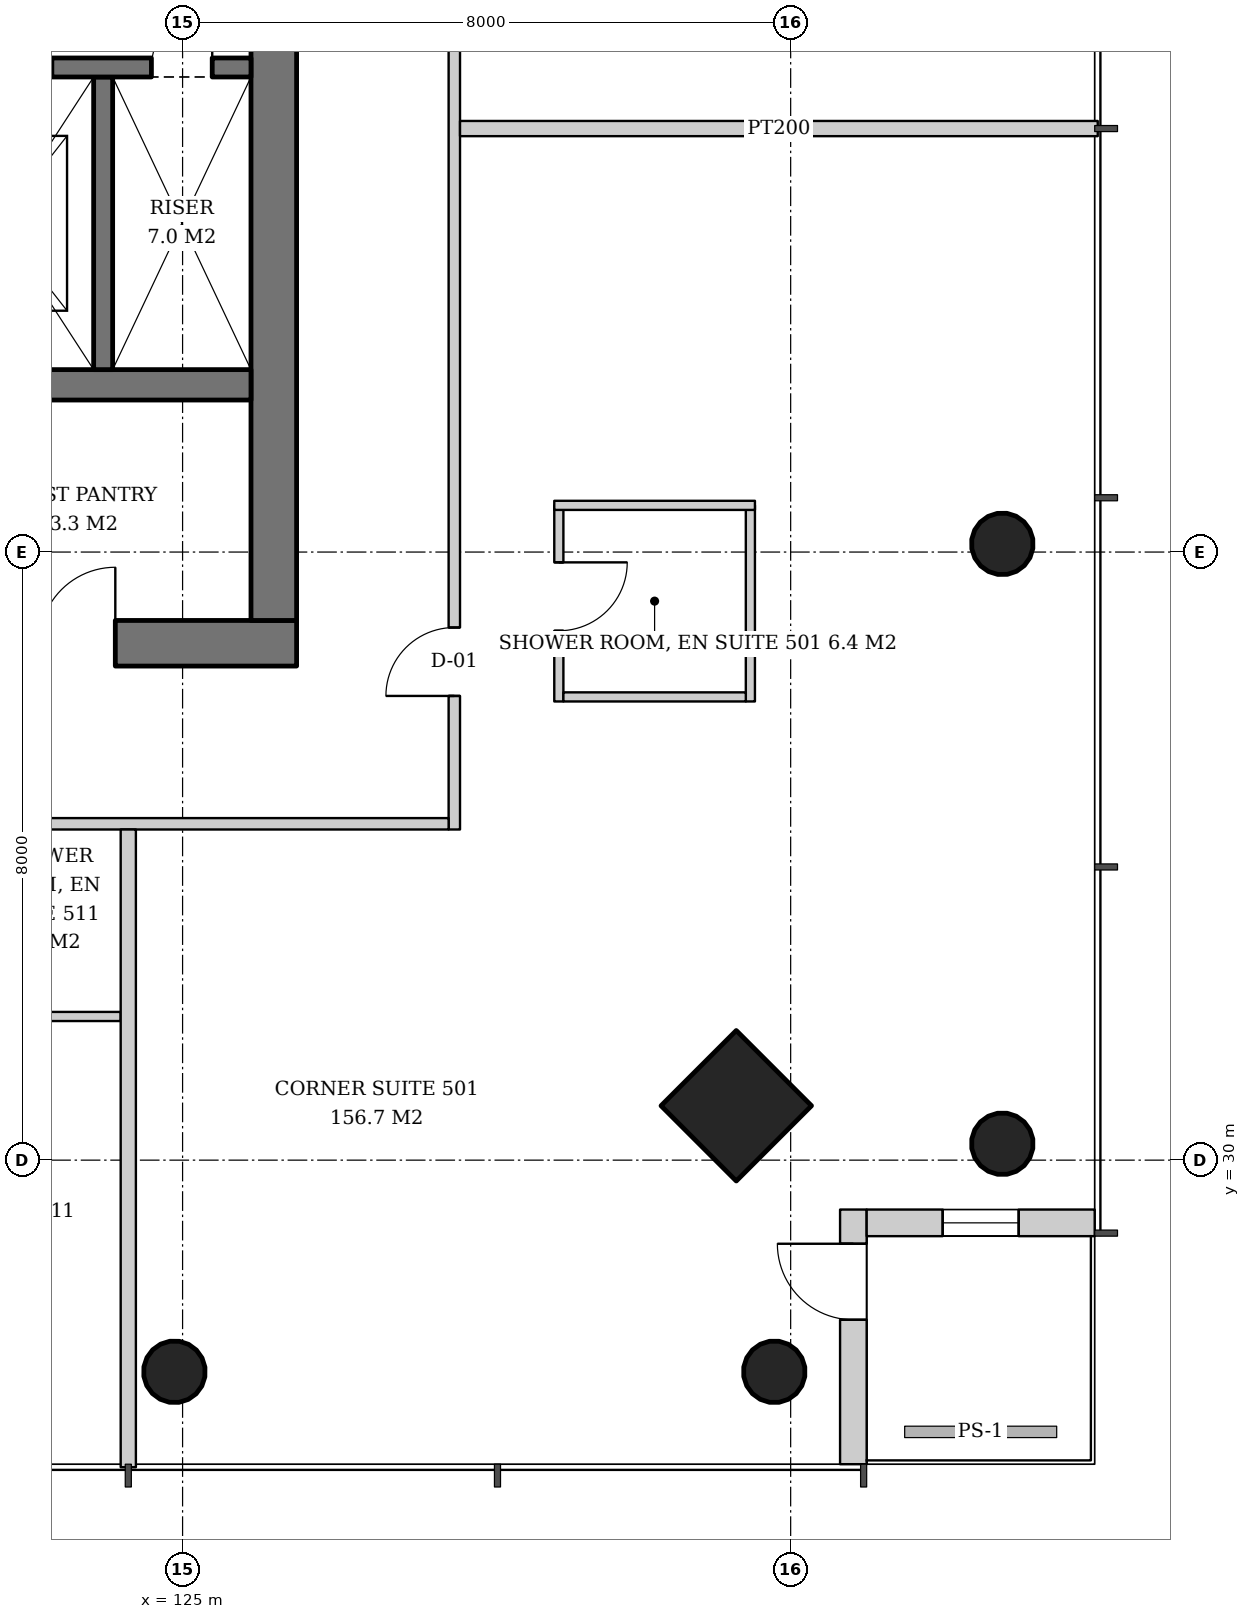
"""IFC4 building model, lengths in metres.
Left out: names, types, materials, properties, quantities, classifications, styles, units other than length and angle.
Written with IfcOpenShell. Run it as: python <this file> out.ifc"""

import sys

from ifc_helpers import new_model, si_unit, direction, frame, frame_2d, origin, origin_2d, place, context, subcontext, project, spatial, rectangle, hollow_circle, extrude, element, fill, save


model = new_model("IFC4")
c1 = context("Model", 3, precision=1e-05, world=origin(), true_north=direction((0.0, 1.0)))
c2 = subcontext(c1, "Body", "Model", "MODEL_VIEW")
j1 = project(units=[si_unit("LENGTHUNIT", "METRE"), si_unit("PLANEANGLEUNIT", "RADIAN")], contexts=[c1])
p1 = place(None, origin())
s1 = spatial("IfcSite", under=j1, at=p1, CompositionType="ELEMENT")
p2 = place(p1, origin())
s2 = spatial("IfcBuilding", under=s1, at=p2, CompositionType="ELEMENT")
p3 = place(p2, frame((0.0, 0.0, 24.8)))
s3 = spatial("IfcBuildingStorey", under=s2, at=p3, CompositionType="ELEMENT", Elevation=24.8)
p4 = place(p3, frame((135.836, 30.164, 0.0), z_axis=(-0.043029647111, 0.043029647111, 0.998146732169), x_axis=(-0.707106781187, -0.707106781187, 0.0)))
e1 = element("IfcColumn", 1, at=p4, inside=s3, PredefinedType="COLUMN", context=c2, shape_type="SweptSolid", body=[
    extrude(hollow_circle(Radius=0.406, WallThickness=0.03, at=origin_2d()), origin(), (0.0, 0.0, 1.0), 3.807),
])
p5 = place(p3, frame((135.836, 38.082, 0.0), z_axis=(-0.043059525333, 0.021561848751, 0.998839808957), x_axis=(-0.44774654769, -0.894160516368, 0.0)))
e2 = element("IfcColumn", 2, at=p5, inside=s3, PredefinedType="COLUMN", context=c2, shape_type="SweptSolid", body=[
    extrude(hollow_circle(Radius=0.406, WallThickness=0.03, at=origin_2d()), origin(), (0.0, 0.0, 1.0), 3.804),
])
p6 = place(p3, frame((132.336, 30.664, 0.0), z_axis=(-0.043029647111, 0.043029647111, 0.998146732169), x_axis=(-0.707106781187, -0.707106781187, 0.0)))
e3 = element("IfcColumn", 3, at=p6, inside=s3, PredefinedType="COLUMN", context=c2, shape_type="SweptSolid", body=[
    extrude(rectangle(XDim=1.4, YDim=1.4, at=origin_2d()), origin(), (0.0, 0.0, 1.0), 3.807),
])
p7 = place(p3, frame((132.836, 27.164, 0.0), z_axis=(-0.043029647111, 0.043029647111, 0.998146732169), x_axis=(-0.707106781187, -0.707106781187, 0.0)))
e4 = element("IfcColumn", 4, at=p7, inside=s3, PredefinedType="COLUMN", context=c2, shape_type="SweptSolid", body=[
    extrude(hollow_circle(Radius=0.406, WallThickness=0.03, at=origin_2d()), origin(), (0.0, 0.0, 1.0), 3.807),
])
p8 = place(p3, frame((124.918, 27.164, 0.0), z_axis=(-0.021561848751, 0.043059525333, 0.998839808957), x_axis=(-0.894160516368, -0.44774654769, 0.0)))
e5 = element("IfcColumn", 5, at=p8, inside=s3, PredefinedType="COLUMN", context=c2, shape_type="SweptSolid", body=[
    extrude(hollow_circle(Radius=0.406, WallThickness=0.03, at=origin_2d()), origin(), (0.0, 0.0, 1.0), 3.804),
])
p9 = place(p3, frame((107.5, 36.8, 0.0), z_axis=(0.0, 0.0, 1.0), x_axis=(1.0, 0.0, 0.0)))
e6 = element("IfcWall", 6, at=p9, inside=s3, PredefinedType="SHEAR", context=c2, shape_type="SweptSolid", body=[
    extrude(rectangle(XDim=19.0, YDim=0.6, at=frame_2d((9.5, 0.0))), origin(), (0.0, 0.0, 1.0), 3.8),
])
p10 = place(p9, frame((3.9, 0.0, 0.0)))
e7 = element("IfcOpeningElement", 7, at=p10, cuts=e6, PredefinedType="OPENING", context=c2, shape_type="SweptSolid", body=[
    extrude(rectangle(XDim=1.0, YDim=2.1, at=frame_2d((0.5, 1.05))), frame((0.0, 0.31, 0.0), z_axis=(0.0, -1.0, 0.0), x_axis=(1.0, 0.0, 0.0)), (0.0, 0.0, 1.0), 0.62),
])
p11 = place(p9, frame((15.615, 0.0, 0.0)))
e8 = element("IfcOpeningElement", 8, at=p11, cuts=e6, PredefinedType="OPENING", context=c2, shape_type="SweptSolid", body=[
    extrude(rectangle(XDim=1.0, YDim=2.1, at=frame_2d((0.5, 1.05))), frame((0.0, 0.31, 0.0), z_axis=(0.0, -1.0, 0.0), x_axis=(1.0, 0.0, 0.0)), (0.0, 0.0, 1.0), 0.62),
])
p12 = place(p3, frame((126.2, 37.1, 0.0), z_axis=(0.0, 0.0, 1.0), x_axis=(0.0, 1.0, 0.0)))
e9 = element("IfcWall", 9, at=p12, inside=s3, PredefinedType="SHEAR", context=c2, shape_type="SweptSolid", body=[
    extrude(rectangle(XDim=17.8, YDim=0.6, at=frame_2d((8.9, 0.0))), origin(), (0.0, 0.0, 1.0), 3.8),
])
p13 = place(p12, frame((8.0, 0.0, 0.0)))
e10 = element("IfcOpeningElement", 10, at=p13, cuts=e9, PredefinedType="OPENING", context=c2, shape_type="SweptSolid", body=[
    extrude(rectangle(XDim=1.8, YDim=2.4, at=frame_2d((0.9, 1.2))), frame((0.0, 0.31, 0.0), z_axis=(0.0, -1.0, 0.0), x_axis=(1.0, 0.0, 0.0)), (0.0, 0.0, 1.0), 0.62),
])
p14 = place(p3, frame((108.1, 40.2, 0.0), z_axis=(0.0, 0.0, 1.0), x_axis=(1.0, 0.0, 0.0)))
e11 = element("IfcWall", 11, at=p14, inside=s3, PredefinedType="SHEAR", context=c2, shape_type="SweptSolid", body=[
    extrude(rectangle(XDim=17.8, YDim=0.4, at=frame_2d((8.9, 0.0))), origin(), (0.0, 0.0, 1.0), 3.8),
])
p15 = place(p3, frame((133.825, 26.0, 0.0), z_axis=(0.0, 0.0, 1.0), x_axis=(0.0, 1.0, 0.0)))
e12 = element("IfcWall", 12, at=p15, inside=s3, PredefinedType="SOLIDWALL", context=c2, shape_type="SweptSolid", body=[
    extrude(rectangle(XDim=3.35, YDim=0.35, at=frame_2d((1.675, 0.0))), origin(), (0.0, 0.0, 1.0), 3.6),
])
p16 = place(p15, frame((1.9, 0.0, 0.0)))
e13 = element("IfcOpeningElement", 13, at=p16, cuts=e12, PredefinedType="OPENING", context=c2, shape_type="SweptSolid", body=[
    extrude(rectangle(XDim=1.0, YDim=2.4, at=frame_2d((0.5, 1.2))), frame((0.0, 0.185, 0.0), z_axis=(0.0, -1.0, 0.0), x_axis=(1.0, 0.0, 0.0)), (0.0, 0.0, 1.0), 0.37),
])
p17 = place(p3, frame((134.0, 29.175, 0.0), z_axis=(0.0, 0.0, 1.0), x_axis=(1.0, 0.0, 0.0)))
e14 = element("IfcWall", 14, at=p17, inside=s3, PredefinedType="SOLIDWALL", context=c2, shape_type="SweptSolid", body=[
    extrude(rectangle(XDim=3.0, YDim=0.35, at=frame_2d((1.5, 0.0))), origin(), (0.0, 0.0, 1.0), 3.6),
])
p18 = place(p17, frame((1.0, 0.0, 0.9)))
e15 = element("IfcOpeningElement", 15, at=p18, cuts=e14, PredefinedType="OPENING", context=c2, shape_type="SweptSolid", body=[
    extrude(rectangle(XDim=1.0, YDim=2.4, at=frame_2d((0.5, 1.2))), frame((0.0, 0.185, 0.0), z_axis=(0.0, -1.0, 0.0), x_axis=(1.0, 0.0, 0.0)), (0.0, 0.0, 1.0), 0.37),
])
p19 = place(p3, frame((123.955, 44.25, 0.0), z_axis=(0.0, 0.0, 1.0), x_axis=(0.0, -1.0, 0.0)))
e16 = element("IfcWall", 16, at=p19, inside=s3, PredefinedType="SHEAR", context=c2, shape_type="SweptSolid", body=[
    extrude(rectangle(XDim=3.85, YDim=0.25, at=frame_2d((1.925, 0.0))), origin(), (0.0, 0.0, 1.0), 3.8),
])
p20 = place(p3, frame((121.33, 44.375, 0.0), z_axis=(0.0, 0.0, 1.0), x_axis=(1.0, 0.0, 0.0)))
e17 = element("IfcWall", 17, at=p20, inside=s3, PredefinedType="SHEAR", context=c2, shape_type="SweptSolid", body=[
    extrude(rectangle(XDim=4.57, YDim=0.25, at=frame_2d((2.285, 0.0))), origin(), (0.0, 0.0, 1.0), 3.8),
])
p21 = place(p20, frame((0.55, 0.0, 0.0)))
e18 = element("IfcOpeningElement", 18, at=p21, cuts=e17, PredefinedType="OPENING", context=c2, shape_type="SweptSolid", body=[
    extrude(rectangle(XDim=1.4, YDim=2.4, at=frame_2d((0.7, 1.2))), frame((0.0, 0.135, 0.0), z_axis=(0.0, -1.0, 0.0), x_axis=(1.0, 0.0, 0.0)), (0.0, 0.0, 1.0), 0.27),
])
p22 = place(p20, frame((3.26, 0.0, 0.0)))
e19 = element("IfcOpeningElement", 19, at=p22, cuts=e17, PredefinedType="OPENING", context=c2, shape_type="SweptSolid", body=[
    extrude(rectangle(XDim=0.8, YDim=2.0, at=frame_2d((0.4, 1.0))), frame((0.0, 0.135, 0.0), z_axis=(0.0, -1.0, 0.0), x_axis=(1.0, 0.0, 0.0)), (0.0, 0.0, 1.0), 0.27),
])
p23 = place(p3, frame((129.95, 38.614, 0.0), z_axis=(0.0, 0.0, 1.0), x_axis=(0.0, -1.0, 0.0)))
e20 = element("IfcWall", 20, at=p23, inside=s3, PredefinedType="PARTITIONING", context=c2, shape_type="SweptSolid", body=[
    extrude(rectangle(XDim=2.58, YDim=0.12, at=frame_2d((1.29, 0.0))), origin(), (0.0, 0.0, 1.0), 2.8),
])
p24 = place(p23, frame((0.75, 0.0, 0.0)))
e21 = element("IfcOpeningElement", 21, at=p24, cuts=e20, PredefinedType="OPENING", context=c2, shape_type="SweptSolid", body=[
    extrude(rectangle(XDim=0.9, YDim=2.1, at=frame_2d((0.45, 1.05))), frame((0.0, 0.07, 0.0), z_axis=(0.0, -1.0, 0.0), x_axis=(1.0, 0.0, 0.0)), (0.0, 0.0, 1.0), 0.14),
])
p25 = place(p3, frame((132.47, 38.614, 0.0), z_axis=(0.0, 0.0, 1.0), x_axis=(0.0, -1.0, 0.0)))
e22 = element("IfcWall", 22, at=p25, inside=s3, PredefinedType="PARTITIONING", context=c2, shape_type="SweptSolid", body=[
    extrude(rectangle(XDim=2.58, YDim=0.12, at=frame_2d((1.29, 0.0))), origin(), (0.0, 0.0, 1.0), 2.8),
])
p26 = place(p3, frame((130.01, 36.094, 0.0), z_axis=(0.0, 0.0, 1.0), x_axis=(1.0, 0.0, 0.0)))
e23 = element("IfcWall", 23, at=p26, inside=s3, PredefinedType="PARTITIONING", context=c2, shape_type="SweptSolid", body=[
    extrude(rectangle(XDim=2.4, YDim=0.12, at=frame_2d((1.2, 0.0))), origin(), (0.0, 0.0, 1.0), 2.847),
])
p27 = place(p3, frame((129.89, 38.614, 0.0), z_axis=(0.0, 0.0, 1.0), x_axis=(1.0, 0.0, 0.0)))
e24 = element("IfcWall", 24, at=p27, inside=s3, PredefinedType="PARTITIONING", context=c2, shape_type="SweptSolid", body=[
    extrude(rectangle(XDim=2.64, YDim=0.12, at=frame_2d((1.32, 0.0))), origin(), (0.0, 0.0, 1.0), 3.6),
])
p28 = place(p3, frame((128.575, 34.35, 0.0), z_axis=(0.0, 0.0, 1.0), x_axis=(0.0, 1.0, 0.0)))
e25 = element("IfcWall", 25, at=p28, inside=s3, PredefinedType="PARTITIONING", context=c2, shape_type="SweptSolid", body=[
    extrude(rectangle(XDim=23.15, YDim=0.15, at=frame_2d((11.575, 0.0))), origin(), (0.0, 0.0, 1.0), 2.8),
])
p29 = place(p28, frame((1.757, 0.0, 0.0)))
e26 = element("IfcOpeningElement", 26, at=p29, cuts=e25, PredefinedType="OPENING", context=c2, shape_type="SweptSolid", body=[
    extrude(rectangle(XDim=0.9, YDim=2.1, at=frame_2d((0.45, 1.05))), frame((0.0, 0.085, 0.0), z_axis=(0.0, -1.0, 0.0), x_axis=(1.0, 0.0, 0.0)), (0.0, 0.0, 1.0), 0.17),
])
p30 = place(p28, frame((10.428, 0.0, 0.0)))
e27 = element("IfcOpeningElement", 27, at=p30, cuts=e25, PredefinedType="OPENING", context=c2, shape_type="SweptSolid", body=[
    extrude(rectangle(XDim=0.9, YDim=2.1, at=frame_2d((0.45, 1.05))), frame((0.0, 0.085, 0.0), z_axis=(0.0, -1.0, 0.0), x_axis=(1.0, 0.0, 0.0)), (0.0, 0.0, 1.0), 0.17),
])
p31 = place(p28, frame((16.829, 0.0, 0.0)))
e28 = element("IfcOpeningElement", 28, at=p31, cuts=e25, PredefinedType="OPENING", context=c2, shape_type="SweptSolid", body=[
    extrude(rectangle(XDim=0.9, YDim=2.1, at=frame_2d((0.45, 1.05))), frame((0.0, 0.085, 0.0), z_axis=(0.0, -1.0, 0.0), x_axis=(1.0, 0.0, 0.0)), (0.0, 0.0, 1.0), 0.17),
])
p32 = place(p3, frame((128.65, 43.572, 0.0), z_axis=(0.0, 0.0, 1.0), x_axis=(1.0, 0.0, 0.0)))
e29 = element("IfcWall", 29, at=p32, inside=s3, PredefinedType="PARTITIONING", context=c2, shape_type="SweptSolid", body=[
    extrude(rectangle(XDim=8.39, YDim=0.2, at=frame_2d((4.195, 0.0))), origin(), (0.0, 0.0, 1.0), 3.05),
])
p33 = place(p3, frame((121.766, 31.89, 0.0), z_axis=(0.0, 0.0, 1.0), x_axis=(1.0, 0.0, 0.0)))
e30 = element("IfcWall", 30, at=p33, inside=s3, PredefinedType="PARTITIONING", context=c2, shape_type="SweptSolid", body=[
    extrude(rectangle(XDim=2.42, YDim=0.12, at=frame_2d((1.21, 0.0))), origin(), (0.0, 0.0, 1.0), 2.847),
])
p34 = place(p3, frame((105.35, 34.425, 0.0), z_axis=(0.0, 0.0, 1.0), x_axis=(1.0, 0.0, 0.0)))
e31 = element("IfcWall", 31, at=p34, inside=s3, PredefinedType="PARTITIONING", context=c2, shape_type="SweptSolid", body=[
    extrude(rectangle(XDim=23.15, YDim=0.15, at=frame_2d((11.575, 0.0))), origin(), (0.0, 0.0, 1.0), 2.8),
])
p35 = place(p34, frame((1.757, 0.0, 0.0)))
e32 = element("IfcOpeningElement", 32, at=p35, cuts=e31, PredefinedType="OPENING", context=c2, shape_type="SweptSolid", body=[
    extrude(rectangle(XDim=0.9, YDim=2.1, at=frame_2d((0.45, 1.05))), frame((0.0, 0.085, 0.0), z_axis=(0.0, -1.0, 0.0), x_axis=(1.0, 0.0, 0.0)), (0.0, 0.0, 1.0), 0.17),
])
p36 = place(p34, frame((11.971, 0.0, 0.0)))
e33 = element("IfcOpeningElement", 33, at=p36, cuts=e31, PredefinedType="OPENING", context=c2, shape_type="SweptSolid", body=[
    extrude(rectangle(XDim=0.9, YDim=2.1, at=frame_2d((0.45, 1.05))), frame((0.0, 0.085, 0.0), z_axis=(0.0, -1.0, 0.0), x_axis=(1.0, 0.0, 0.0)), (0.0, 0.0, 1.0), 0.17),
])
p37 = place(p34, frame((15.286, 0.0, 0.0)))
e34 = element("IfcOpeningElement", 34, at=p37, cuts=e31, PredefinedType="OPENING", context=c2, shape_type="SweptSolid", body=[
    extrude(rectangle(XDim=0.9, YDim=2.1, at=frame_2d((0.45, 1.05))), frame((0.0, 0.085, 0.0), z_axis=(0.0, -1.0, 0.0), x_axis=(1.0, 0.0, 0.0)), (0.0, 0.0, 1.0), 0.17),
])
p38 = place(p3, frame((124.286, 34.35, 0.0), z_axis=(0.0, 0.0, 1.0), x_axis=(0.0, -1.0, 0.0)))
e35 = element("IfcWall", 35, at=p38, inside=s3, PredefinedType="PARTITIONING", context=c2, shape_type="SweptSolid", body=[
    extrude(rectangle(XDim=8.39, YDim=0.2, at=frame_2d((4.195, 0.0))), origin(), (0.0, 0.0, 1.0), 3.05),
])
p39 = place(p16, origin())
e36 = element("IfcDoor", 36, at=p39, inside=s3, OperationType="SINGLE_SWING_RIGHT", PredefinedType="DOOR", context=c2, shape_type="SweptSolid", body=[
    extrude(rectangle(XDim=1.0, YDim=2.4, at=frame_2d((0.5, 1.2))), frame((0.0, 0.025, 0.0), z_axis=(0.0, -1.0, 0.0), x_axis=(1.0, 0.0, 0.0)), (0.0, 0.0, 1.0), 0.05),
])
fill(e13, e36)
p40 = place(p18, origin())
e37 = element("IfcWindow", 37, at=p40, inside=s3, PartitioningType="SINGLE_PANEL", PredefinedType="WINDOW", context=c2, shape_type="SweptSolid", body=[
    extrude(rectangle(XDim=1.0, YDim=2.4, at=frame_2d((0.5, 1.2))), frame((0.0, 0.03, 0.0), z_axis=(0.0, -1.0, 0.0), x_axis=(1.0, 0.0, 0.0)), (0.0, 0.0, 1.0), 0.06),
])
fill(e15, e37)
p41 = place(p22, origin())
e38 = element("IfcDoor", 38, at=p41, inside=s3, OperationType="SINGLE_SWING_RIGHT", PredefinedType="DOOR", context=c2, shape_type="SweptSolid", body=[
    extrude(rectangle(XDim=0.8, YDim=2.0, at=frame_2d((0.4, 1.0))), frame((0.0, 0.025, 0.0), z_axis=(0.0, -1.0, 0.0), x_axis=(1.0, 0.0, 0.0)), (0.0, 0.0, 1.0), 0.05),
])
fill(e19, e38)
p42 = place(p11, origin())
e39 = element("IfcDoor", 39, at=p42, inside=s3, OperationType="SINGLE_SWING_RIGHT", PredefinedType="DOOR", context=c2, shape_type="SweptSolid", body=[
    extrude(rectangle(XDim=1.0, YDim=2.1, at=frame_2d((0.5, 1.05))), frame((0.0, 0.29, 0.0), z_axis=(0.0, -1.0, 0.0), x_axis=(1.0, 0.0, 0.0)), (0.0, 0.0, 1.0), 0.05),
])
fill(e8, e39)
p43 = place(p24, origin())
e40 = element("IfcDoor", 40, at=p43, inside=s3, OperationType="SINGLE_SWING_LEFT", PredefinedType="DOOR", context=c2, shape_type="SweptSolid", body=[
    extrude(rectangle(XDim=0.9, YDim=2.1, at=frame_2d((0.45, 1.05))), frame((0.0, 0.025, 0.0), z_axis=(0.0, -1.0, 0.0), x_axis=(1.0, 0.0, 0.0)), (0.0, 0.0, 1.0), 0.05),
])
fill(e21, e40)
p44 = place(p29, origin())
e41 = element("IfcDoor", 41, at=p44, inside=s3, OperationType="SINGLE_SWING_LEFT", PredefinedType="DOOR", context=c2, shape_type="SweptSolid", body=[
    extrude(rectangle(XDim=0.9, YDim=2.1, at=frame_2d((0.45, 1.05))), frame((0.0, 0.025, 0.0), z_axis=(0.0, -1.0, 0.0), x_axis=(1.0, 0.0, 0.0)), (0.0, 0.0, 1.0), 0.05),
])
fill(e26, e41)
save(model, sys.argv[1])
